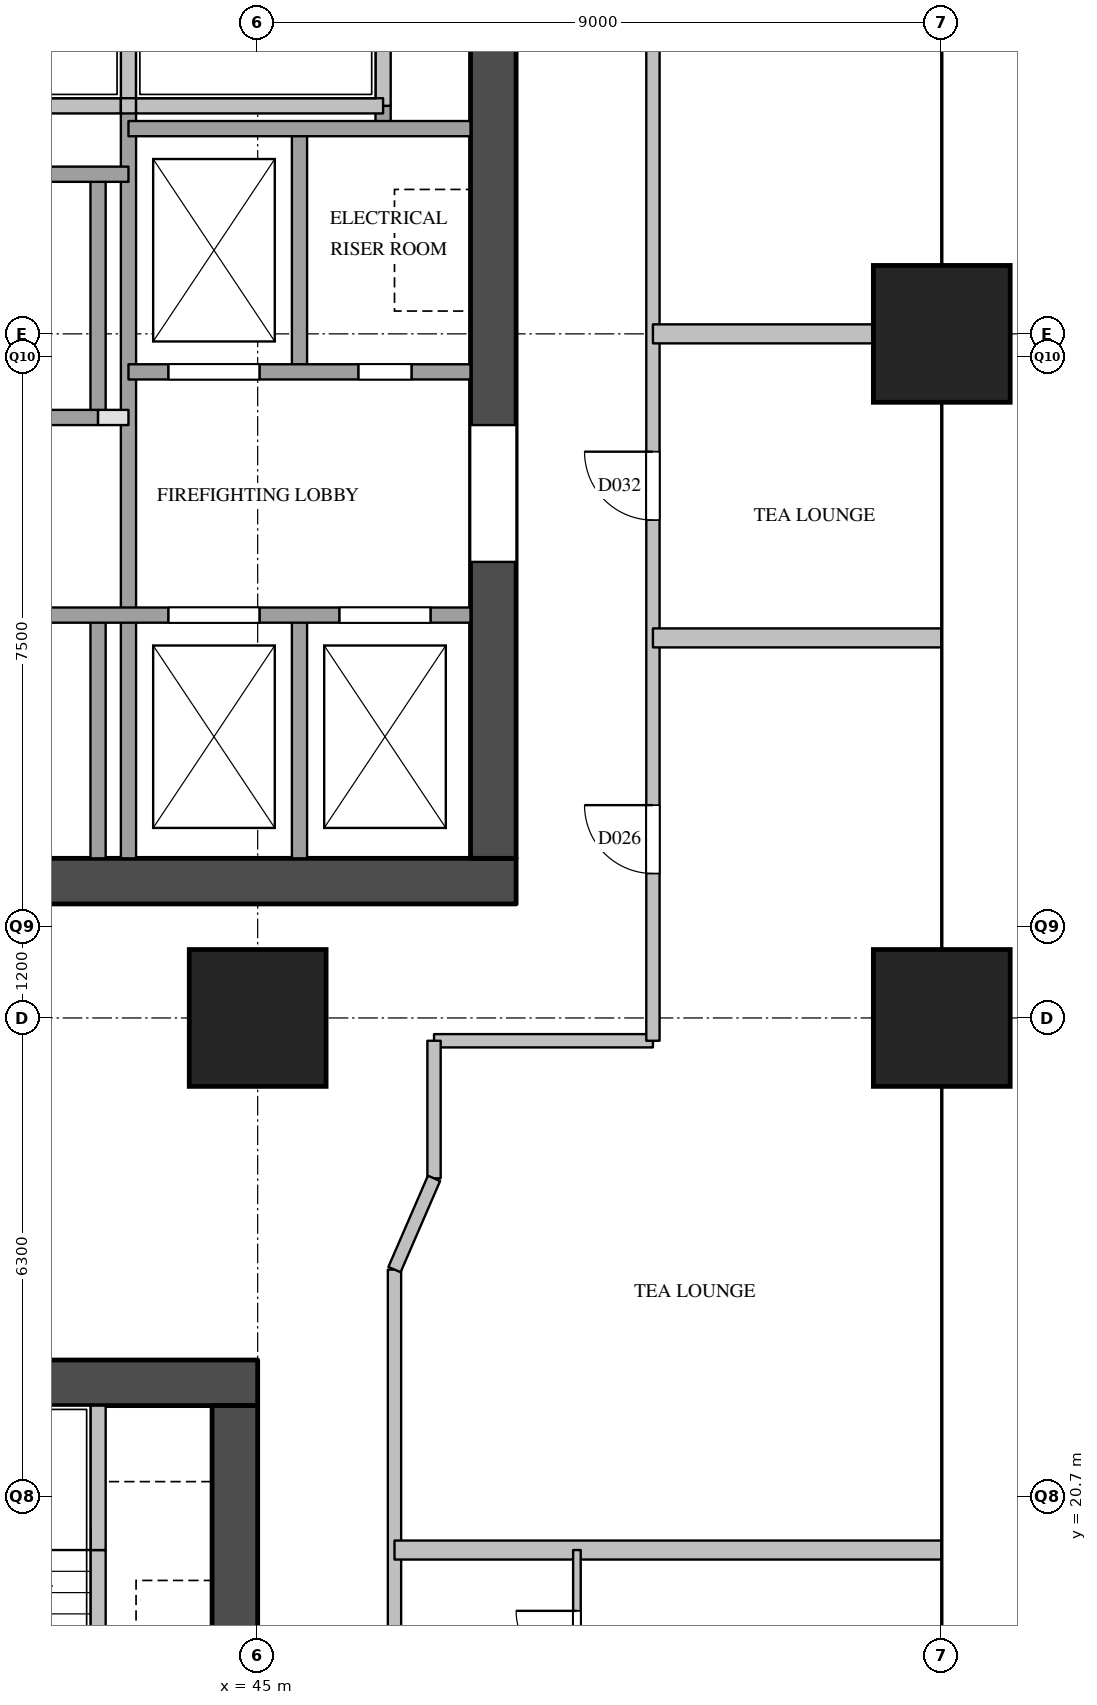
"""IFC4 building model, lengths in metres.
Left out: names, types, materials, properties, quantities, classifications, styles, units other than length and angle.
Written with IfcOpenShell. Run it as: python <this file> out.ifc"""

import sys

from ifc_helpers import new_model, si_unit, direction, frame, frame_2d, origin, origin_2d, place, context, subcontext, project, spatial, rectangle, extrude, element, fill, save


model = new_model("IFC4")
c1 = context("Model", 3, precision=1e-05, world=origin(), true_north=direction((0.0, 1.0)))
c2 = subcontext(c1, "Body", "Model", "MODEL_VIEW")
j1 = project(units=[si_unit("LENGTHUNIT", "METRE"), si_unit("PLANEANGLEUNIT", "RADIAN")], contexts=[c1])
p1 = place(None, origin())
s1 = spatial("IfcSite", under=j1, at=p1, CompositionType="ELEMENT")
p2 = place(p1, origin())
s2 = spatial("IfcBuilding", under=s1, at=p2, CompositionType="ELEMENT")
p3 = place(p2, frame((0.0, 0.0, 34.8)))
s3 = spatial("IfcBuildingStorey", under=s2, at=p3, CompositionType="ELEMENT", Elevation=34.8)
for number, where, z_axis, x_axis in (
    (1, (45.0, 27.0, 0.0), (0.0, 0.0, 1.0), (1.0, 0.0, 0.0)),
    (2, (54.0, 27.0, 0.0), (0.0, 0.0, 1.0), (1.0, 0.0, 0.0)),
    (3, (54.0, 36.0, 0.0), (0.0, 0.0, 1.0), (1.0, 0.0, 0.0)),
):
    element("IfcColumn", number, at=place(p3, frame(where, z_axis=z_axis, x_axis=x_axis)), inside=s3, PredefinedType="COLUMN", context=c2, shape_type="SweptSolid", body=[
        extrude(rectangle(XDim=1.8, YDim=1.8, at=origin_2d()), origin(), (0.0, 0.0, 1.0), 3.8),
    ])
p4 = place(p3, frame((36.0, 28.8, 0.0), z_axis=(0.0, 0.0, 1.0), x_axis=(1.0, 0.0, 0.0)))
e4 = element("IfcWall", 4, at=p4, inside=s3, PredefinedType="SHEAR", context=c2, shape_type="SweptSolid", body=[
    extrude(rectangle(XDim=12.4, YDim=0.6, at=frame_2d((6.2, 0.0))), origin(), (0.0, 0.0, 1.0), 3.5),
])
p5 = place(p3, frame((48.1, 29.1, 0.0), z_axis=(0.0, 0.0, 1.0), x_axis=(0.0, 1.0, 0.0)))
e5 = element("IfcWall", 5, at=p5, inside=s3, PredefinedType="SHEAR", context=c2, shape_type="SweptSolid", body=[
    extrude(rectangle(XDim=20.3, YDim=0.6, at=frame_2d((10.15, 0.0))), origin(), (0.0, 0.0, 1.0), 3.5),
])
p6 = place(p5, frame((12.5, 0.0, 0.0)))
e6 = element("IfcOpeningElement", 6, at=p6, cuts=e5, PredefinedType="OPENING", context=c2, shape_type="SweptSolid", body=[
    extrude(rectangle(XDim=0.7, YDim=2.1, at=frame_2d((0.35, 1.05))), frame((0.0, 0.31, 0.0), z_axis=(0.0, -1.0, 0.0), x_axis=(1.0, 0.0, 0.0)), (0.0, 0.0, 1.0), 0.62),
])
p7 = place(p5, frame((3.9, 0.0, 0.0)))
e7 = element("IfcOpeningElement", 7, at=p7, cuts=e5, PredefinedType="OPENING", context=c2, shape_type="SweptSolid", body=[
    extrude(rectangle(XDim=1.8, YDim=2.1, at=frame_2d((0.9, 1.05))), frame((0.0, 0.31, 0.0), z_axis=(0.0, -1.0, 0.0), x_axis=(1.0, 0.0, 0.0)), (0.0, 0.0, 1.0), 0.62),
])
p8 = place(p3, frame((42.9, 29.1, 0.0), z_axis=(0.0, 0.0, 1.0), x_axis=(0.0, 1.0, 0.0)))
e8 = element("IfcWall", 8, at=p8, inside=s3, PredefinedType="SOLIDWALL", context=c2, shape_type="SweptSolid", body=[
    extrude(rectangle(XDim=3.2, YDim=0.2, at=frame_2d((1.6, 0.0))), origin(), (0.0, 0.0, 1.0), 3.5),
])
p9 = place(p3, frame((42.9, 34.9, 0.0), z_axis=(0.0, 0.0, 1.0), x_axis=(0.0, 1.0, 0.0)))
e9 = element("IfcWall", 9, at=p9, inside=s3, PredefinedType="SOLIDWALL", context=c2, shape_type="SweptSolid", body=[
    extrude(rectangle(XDim=3.2, YDim=0.2, at=frame_2d((1.6, 0.0))), origin(), (0.0, 0.0, 1.0), 3.5),
])
p10 = place(p3, frame((43.3, 29.1, 0.0), z_axis=(0.0, 0.0, 1.0), x_axis=(0.0, 1.0, 0.0)))
e10 = element("IfcWall", 10, at=p10, inside=s3, PredefinedType="SOLIDWALL", context=c2, shape_type="SweptSolid", body=[
    extrude(rectangle(XDim=9.9, YDim=0.2, at=frame_2d((4.95, 0.0))), origin(), (0.0, 0.0, 1.0), 3.5),
])
p11 = place(p3, frame((43.3, 39.0, 0.0), z_axis=(0.0, 0.0, 1.0), x_axis=(0.0, 1.0, 0.0)))
e11 = element("IfcWall", 11, at=p11, inside=s3, PredefinedType="SOLIDWALL", context=c2, shape_type="SweptSolid", body=[
    extrude(rectangle(XDim=1.78, YDim=0.2, at=frame_2d((0.89, 0.0))), origin(), (0.0, 0.0, 1.0), 3.5),
])
for number, where, z_axis, x_axis in (
    (12, (45.55, 29.1, 0.0), (0.0, 0.0, 1.0), (0.0, 1.0, 0.0)),
    (13, (45.55, 35.5, 0.0), (0.0, 0.0, 1.0), (0.0, 1.0, 0.0)),
):
    element("IfcWall", number, at=place(p3, frame(where, z_axis=z_axis, x_axis=x_axis)), inside=s3, PredefinedType="SOLIDWALL", context=c2, shape_type="SweptSolid", body=[
        extrude(rectangle(XDim=3.2, YDim=0.2, at=frame_2d((1.6, 0.0))), origin(), (0.0, 0.0, 1.0), 3.5),
    ])
p12 = place(p3, frame((46.65, 38.7, 0.0), z_axis=(0.0, 0.0, 1.0), x_axis=(0.0, 1.0, 0.0)))
e14 = element("IfcWall", 14, at=p12, inside=s3, PredefinedType="SOLIDWALL", context=c2, shape_type="SweptSolid", body=[
    extrude(rectangle(XDim=0.3, YDim=0.2, at=frame_2d((0.15, 0.0))), origin(), (0.0, 0.0, 1.0), 3.5),
])
p13 = place(p3, frame((46.65, 39.0, 0.0), z_axis=(0.0, 0.0, 1.0), x_axis=(0.0, 1.0, 0.0)))
e15 = element("IfcWall", 15, at=p13, inside=s3, PredefinedType="SOLIDWALL", context=c2, shape_type="SweptSolid", body=[
    extrude(rectangle(XDim=1.78, YDim=0.2, at=frame_2d((0.89, 0.0))), origin(), (0.0, 0.0, 1.0), 3.5),
])
p14 = place(p3, frame((36.6, 32.3, 0.0), z_axis=(0.0, 0.0, 1.0), x_axis=(1.0, 0.0, 0.0)))
e16 = element("IfcWall", 16, at=p14, inside=s3, PredefinedType="SOLIDWALL", context=c2, shape_type="SweptSolid", body=[
    extrude(rectangle(XDim=11.2, YDim=0.2, at=frame_2d((5.6, 0.0))), origin(), (0.0, 0.0, 1.0), 3.5),
])
p15 = place(p14, frame((7.225, 0.0, 0.0)))
e17 = element("IfcOpeningElement", 17, at=p15, cuts=e16, PredefinedType="OPENING", context=c2, shape_type="SweptSolid", body=[
    extrude(rectangle(XDim=1.2, YDim=2.1, at=frame_2d((0.6, 1.05))), frame((0.0, 0.11, 0.0), z_axis=(0.0, -1.0, 0.0), x_axis=(1.0, 0.0, 0.0)), (0.0, 0.0, 1.0), 0.22),
])
p16 = place(p14, frame((9.475, 0.0, 0.0)))
e18 = element("IfcOpeningElement", 18, at=p16, cuts=e16, PredefinedType="OPENING", context=c2, shape_type="SweptSolid", body=[
    extrude(rectangle(XDim=1.2, YDim=2.1, at=frame_2d((0.6, 1.05))), frame((0.0, 0.11, 0.0), z_axis=(0.0, -1.0, 0.0), x_axis=(1.0, 0.0, 0.0)), (0.0, 0.0, 1.0), 0.22),
])
p17 = place(p3, frame((42.9, 34.9, 0.0), z_axis=(0.0, 0.0, 1.0), x_axis=(1.0, 0.0, 0.0)))
e19 = element("IfcWall", 19, at=p17, inside=s3, PredefinedType="PARTITIONING", context=c2, shape_type="SweptSolid", body=[
    extrude(rectangle(XDim=0.4, YDim=0.2, at=frame_2d((0.2, 0.0))), origin(), (0.0, 0.0, 1.0), 3.5),
])
p18 = place(p3, frame((36.6, 34.9, 0.0), z_axis=(0.0, 0.0, 1.0), x_axis=(1.0, 0.0, 0.0)))
e20 = element("IfcWall", 20, at=p18, inside=s3, PredefinedType="SOLIDWALL", context=c2, shape_type="SweptSolid", body=[
    extrude(rectangle(XDim=6.3, YDim=0.2, at=frame_2d((3.15, 0.0))), origin(), (0.0, 0.0, 1.0), 3.5),
])
p19 = place(p3, frame((43.3, 35.5, 0.0), z_axis=(0.0, 0.0, 1.0), x_axis=(1.0, 0.0, 0.0)))
e21 = element("IfcWall", 21, at=p19, inside=s3, PredefinedType="SOLIDWALL", context=c2, shape_type="SweptSolid", body=[
    extrude(rectangle(XDim=4.5, YDim=0.2, at=frame_2d((2.25, 0.0))), origin(), (0.0, 0.0, 1.0), 3.5),
])
p20 = place(p19, frame((0.525, 0.0, 0.0)))
e22 = element("IfcOpeningElement", 22, at=p20, cuts=e21, PredefinedType="OPENING", context=c2, shape_type="SweptSolid", body=[
    extrude(rectangle(XDim=1.2, YDim=2.1, at=frame_2d((0.6, 1.05))), frame((0.0, 0.11, 0.0), z_axis=(0.0, -1.0, 0.0), x_axis=(1.0, 0.0, 0.0)), (0.0, 0.0, 1.0), 0.22),
])
p21 = place(p19, frame((3.025, 0.0, 0.0)))
e23 = element("IfcOpeningElement", 23, at=p21, cuts=e21, PredefinedType="OPENING", context=c2, shape_type="SweptSolid", body=[
    extrude(rectangle(XDim=0.7, YDim=2.1, at=frame_2d((0.35, 1.05))), frame((0.0, 0.11, 0.0), z_axis=(0.0, -1.0, 0.0), x_axis=(1.0, 0.0, 0.0)), (0.0, 0.0, 1.0), 0.22),
])
p22 = place(p3, frame((36.6, 38.1, 0.0), z_axis=(0.0, 0.0, 1.0), x_axis=(1.0, 0.0, 0.0)))
e24 = element("IfcWall", 24, at=p22, inside=s3, PredefinedType="SOLIDWALL", context=c2, shape_type="SweptSolid", body=[
    extrude(rectangle(XDim=6.7, YDim=0.2, at=frame_2d((3.35, 0.0))), origin(), (0.0, 0.0, 1.0), 3.5),
])
p23 = place(p3, frame((43.3, 38.7, 0.0), z_axis=(0.0, 0.0, 1.0), x_axis=(1.0, 0.0, 0.0)))
e25 = element("IfcWall", 25, at=p23, inside=s3, PredefinedType="SOLIDWALL", context=c2, shape_type="SweptSolid", body=[
    extrude(rectangle(XDim=4.5, YDim=0.2, at=frame_2d((2.25, 0.0))), origin(), (0.0, 0.0, 1.0), 3.5),
])
p24 = place(p3, frame((40.05, 39.0, 0.0), z_axis=(0.0, 0.0, 1.0), x_axis=(1.0, 0.0, 0.0)))
e26 = element("IfcWall", 26, at=p24, inside=s3, PredefinedType="SOLIDWALL", context=c2, shape_type="SweptSolid", body=[
    extrude(rectangle(XDim=3.15, YDim=0.2, at=frame_2d((1.575, 0.0))), origin(), (0.0, 0.0, 1.0), 3.5),
])
p25 = place(p3, frame((43.2, 39.0, 0.0), z_axis=(0.0, 0.0, 1.0), x_axis=(1.0, 0.0, 0.0)))
e27 = element("IfcWall", 27, at=p25, inside=s3, PredefinedType="SOLIDWALL", context=c2, shape_type="SweptSolid", body=[
    extrude(rectangle(XDim=0.2, YDim=0.2, at=frame_2d((0.1, 0.0))), origin(), (0.0, 0.0, 1.0), 3.5),
])
p26 = place(p3, frame((43.4, 39.0, 0.0), z_axis=(0.0, 0.0, 1.0), x_axis=(1.0, 0.0, 0.0)))
e28 = element("IfcWall", 28, at=p26, inside=s3, PredefinedType="SOLIDWALL", context=c2, shape_type="SweptSolid", body=[
    extrude(rectangle(XDim=3.25, YDim=0.2, at=frame_2d((1.625, 0.0))), origin(), (0.0, 0.0, 1.0), 3.5),
])
p27 = place(p3, frame((36.0, 22.2, 0.0), z_axis=(0.0, 0.0, 1.0), x_axis=(1.0, 0.0, 0.0)))
e29 = element("IfcWall", 29, at=p27, inside=s3, PredefinedType="SHEAR", context=c2, shape_type="SweptSolid", body=[
    extrude(rectangle(XDim=9.0, YDim=0.6, at=frame_2d((4.5, 0.0))), origin(), (0.0, 0.0, 1.0), 3.5),
])
p28 = place(p3, frame((44.7, 9.6, 0.0), z_axis=(0.0, 0.0, 1.0), x_axis=(0.0, 1.0, 0.0)))
e30 = element("IfcWall", 30, at=p28, inside=s3, PredefinedType="SHEAR", context=c2, shape_type="SweptSolid", body=[
    extrude(rectangle(XDim=12.3, YDim=0.6, at=frame_2d((6.15, 0.0))), origin(), (0.0, 0.0, 1.0), 3.5),
])
p29 = place(p28, frame((0.8, 0.0, 0.0)))
e31 = element("IfcOpeningElement", 31, at=p29, cuts=e30, PredefinedType="OPENING", context=c2, shape_type="SweptSolid", body=[
    extrude(rectangle(XDim=0.7, YDim=2.1, at=frame_2d((0.35, 1.05))), frame((0.0, 0.31, 0.0), z_axis=(0.0, -1.0, 0.0), x_axis=(1.0, 0.0, 0.0)), (0.0, 0.0, 1.0), 0.62),
])
p30 = place(p3, frame((42.9, 15.7, 0.0), z_axis=(0.0, 0.0, 1.0), x_axis=(0.0, 1.0, 0.0)))
e32 = element("IfcWall", 32, at=p30, inside=s3, PredefinedType="SOLIDWALL", context=c2, shape_type="SweptSolid", body=[
    extrude(rectangle(XDim=4.3, YDim=0.2, at=frame_2d((2.15, 0.0))), origin(), (0.0, 0.0, 1.0), 3.5),
])
p31 = place(p3, frame((42.9, 20.0, 0.0), z_axis=(0.0, 0.0, 1.0), x_axis=(0.0, 1.0, 0.0)))
e33 = element("IfcWall", 33, at=p31, inside=s3, PredefinedType="SOLIDWALL", context=c2, shape_type="SweptSolid", body=[
    extrude(rectangle(XDim=1.9, YDim=0.2, at=frame_2d((0.95, 0.0))), origin(), (0.0, 0.0, 1.0), 3.5),
])
p32 = place(p3, frame((47.32, 26.7, 0.0), z_axis=(0.0, 0.0, 1.0), x_axis=(1.0, 0.0, 0.0)))
e34 = element("IfcWall", 34, at=p32, inside=s3, PredefinedType="PARTITIONING", context=c2, shape_type="SweptSolid", body=[
    extrude(rectangle(XDim=2.88, YDim=0.175, at=frame_2d((1.44, 0.0))), origin(), (0.0, 0.0, 1.0), 2.5),
])
p33 = place(p3, frame((46.8, 7.2, 0.0), z_axis=(0.0, 0.0, 1.0), x_axis=(0.0, 1.0, 0.0)))
e35 = element("IfcWall", 35, at=p33, inside=s3, PredefinedType="PARTITIONING", context=c2, shape_type="SweptSolid", body=[
    extrude(rectangle(XDim=16.49, YDim=0.175, at=frame_2d((8.245, 0.0))), origin(), (0.0, 0.0, 1.0), 3.5),
])
p34 = place(p33, frame((3.1, 0.0, 0.0)))
e36 = element("IfcOpeningElement", 36, at=p34, cuts=e35, PredefinedType="OPENING", context=c2, shape_type="SweptSolid", body=[
    extrude(rectangle(XDim=1.0, YDim=2.1, at=frame_2d((0.5, 1.05))), frame((0.0, 0.097, 0.0), z_axis=(0.0, -1.0, 0.0), x_axis=(1.0, 0.0, 0.0)), (0.0, 0.0, 1.0), 0.195),
])
p35 = place(p33, frame((9.1, 0.0, 0.0)))
e37 = element("IfcOpeningElement", 37, at=p35, cuts=e35, PredefinedType="OPENING", context=c2, shape_type="SweptSolid", body=[
    extrude(rectangle(XDim=1.0, YDim=2.1, at=frame_2d((0.5, 1.05))), frame((0.0, 0.097, 0.0), z_axis=(0.0, -1.0, 0.0), x_axis=(1.0, 0.0, 0.0)), (0.0, 0.0, 1.0), 0.195),
])
p36 = place(p3, frame((47.32, 24.89, 0.0), z_axis=(0.0, 0.0, 1.0), x_axis=(0.0, 1.0, 0.0)))
e38 = element("IfcWall", 38, at=p36, inside=s3, PredefinedType="PARTITIONING", context=c2, shape_type="SweptSolid", body=[
    extrude(rectangle(XDim=1.81, YDim=0.175, at=frame_2d((0.905, 0.0))), origin(), (0.0, 0.0, 1.0), 2.5),
])
p37 = place(p3, frame((50.2, 26.7, 0.0), z_axis=(0.0, 0.0, 1.0), x_axis=(0.0, 1.0, 0.0)))
e39 = element("IfcWall", 39, at=p37, inside=s3, PredefinedType="PARTITIONING", context=c2, shape_type="SweptSolid", body=[
    extrude(rectangle(XDim=25.1, YDim=0.175, at=frame_2d((12.55, 0.0))), origin(), (0.0, 0.0, 1.0), 2.5),
])
p38 = place(p37, frame((2.2, 0.0, 0.0)))
e40 = element("IfcOpeningElement", 40, at=p38, cuts=e39, PredefinedType="OPENING", context=c2, shape_type="SweptSolid", body=[
    extrude(rectangle(XDim=0.9, YDim=2.1, at=frame_2d((0.45, 1.05))), frame((0.0, 0.097, 0.0), z_axis=(0.0, -1.0, 0.0), x_axis=(1.0, 0.0, 0.0)), (0.0, 0.0, 1.0), 0.195),
])
p39 = place(p37, frame((6.85, 0.0, 0.0)))
e41 = element("IfcOpeningElement", 41, at=p39, cuts=e39, PredefinedType="OPENING", context=c2, shape_type="SweptSolid", body=[
    extrude(rectangle(XDim=0.9, YDim=2.1, at=frame_2d((0.45, 1.05))), frame((0.0, 0.097, 0.0), z_axis=(0.0, -1.0, 0.0), x_axis=(1.0, 0.0, 0.0)), (0.0, 0.0, 1.0), 0.195),
])
p40 = place(p37, frame((16.75, 0.0, 0.0)))
e42 = element("IfcOpeningElement", 42, at=p40, cuts=e39, PredefinedType="OPENING", context=c2, shape_type="SweptSolid", body=[
    extrude(rectangle(XDim=0.9, YDim=2.1, at=frame_2d((0.45, 1.05))), frame((0.0, 0.097, 0.0), z_axis=(0.0, -1.0, 0.0), x_axis=(1.0, 0.0, 0.0)), (0.0, 0.0, 1.0), 0.195),
])
p41 = place(p3, frame((46.8, 20.0, 0.0), z_axis=(0.0, 0.0, 1.0), x_axis=(1.0, 0.0, 0.0)))
e43 = element("IfcWall", 43, at=p41, inside=s3, PredefinedType="PARTITIONING", context=c2, shape_type="SweptSolid", body=[
    extrude(rectangle(XDim=7.2, YDim=0.25, at=frame_2d((3.6, 0.0))), origin(), (0.0, 0.0, 1.0), 2.5),
])
p42 = place(p3, frame((50.2, 32.0, 0.0), z_axis=(0.0, 0.0, 1.0), x_axis=(1.0, 0.0, 0.0)))
e44 = element("IfcWall", 44, at=p42, inside=s3, PredefinedType="PARTITIONING", context=c2, shape_type="SweptSolid", body=[
    extrude(rectangle(XDim=3.8, YDim=0.25, at=frame_2d((1.9, 0.0))), origin(), (0.0, 0.0, 1.0), 2.5),
])
p43 = place(p3, frame((50.2, 36.0, 0.0), z_axis=(0.0, 0.0, 1.0), x_axis=(1.0, 0.0, 0.0)))
e45 = element("IfcWall", 45, at=p43, inside=s3, PredefinedType="PARTITIONING", context=c2, shape_type="SweptSolid", body=[
    extrude(rectangle(XDim=3.8, YDim=0.25, at=frame_2d((1.9, 0.0))), origin(), (0.0, 0.0, 1.0), 3.5),
])
p44 = place(p3, frame((49.2, 17.6, 0.0), z_axis=(0.0, 0.0, 1.0), x_axis=(0.0, 1.0, 0.0)))
e46 = element("IfcWall", 46, at=p44, inside=s3, PredefinedType="PARTITIONING", context=c2, shape_type="SweptSolid", body=[
    extrude(rectangle(XDim=2.4, YDim=0.1, at=frame_2d((1.2, 0.0))), origin(), (0.0, 0.0, 1.0), 3.5),
])
p45 = place(p44, frame((0.8, 0.0, 0.0)))
e47 = element("IfcOpeningElement", 47, at=p45, cuts=e46, PredefinedType="OPENING", context=c2, shape_type="SweptSolid", body=[
    extrude(rectangle(XDim=0.8, YDim=2.1, at=frame_2d((0.4, 1.05))), frame((0.0, 0.06, 0.0), z_axis=(0.0, -1.0, 0.0), x_axis=(1.0, 0.0, 0.0)), (0.0, 0.0, 1.0), 0.12),
])
p46 = place(p3, frame((47.32, 24.89, 0.0), z_axis=(0.0, 0.0, 1.0), x_axis=(-0.397633632391, -0.917544273804, 0.0)))
e48 = element("IfcWall", 48, at=p46, inside=s3, PredefinedType="PARTITIONING", context=c2, shape_type="SweptSolid", body=[
    extrude(rectangle(XDim=1.308, YDim=0.175, at=frame_2d((0.654, 0.0))), origin(), (0.0, 0.0, 1.0), 3.5),
])
p47 = place(p15, origin())
e49 = element("IfcDoor", 49, at=p47, inside=s3, OperationType="SLIDING_TO_LEFT", PredefinedType="DOOR", context=c2, shape_type="SweptSolid", body=[
    extrude(rectangle(XDim=1.2, YDim=2.1, at=frame_2d((0.6, 1.05))), frame((0.0, 0.025, 0.0), z_axis=(0.0, -1.0, 0.0), x_axis=(1.0, 0.0, 0.0)), (0.0, 0.0, 1.0), 0.05),
])
fill(e17, e49)
p48 = place(p16, origin())
e50 = element("IfcDoor", 50, at=p48, inside=s3, OperationType="SLIDING_TO_LEFT", PredefinedType="DOOR", context=c2, shape_type="SweptSolid", body=[
    extrude(rectangle(XDim=1.2, YDim=2.1, at=frame_2d((0.6, 1.05))), frame((0.0, 0.025, 0.0), z_axis=(0.0, -1.0, 0.0), x_axis=(1.0, 0.0, 0.0)), (0.0, 0.0, 1.0), 0.05),
])
fill(e18, e50)
p49 = place(p20, origin())
e51 = element("IfcDoor", 51, at=p49, inside=s3, OperationType="SLIDING_TO_LEFT", PredefinedType="DOOR", context=c2, shape_type="SweptSolid", body=[
    extrude(rectangle(XDim=1.2, YDim=2.1, at=frame_2d((0.6, 1.05))), frame((0.0, 0.025, 0.0), z_axis=(0.0, -1.0, 0.0), x_axis=(1.0, 0.0, 0.0)), (0.0, 0.0, 1.0), 0.05),
])
fill(e22, e51)
p50 = place(p7, origin())
e52 = element("IfcDoor", 52, at=p50, inside=s3, OperationType="DOUBLE_DOOR_SINGLE_SWING", PredefinedType="DOOR", context=c2, shape_type="SweptSolid", body=[
    extrude(rectangle(XDim=1.8, YDim=2.1, at=frame_2d((0.9, 1.05))), frame((0.0, 0.025, 0.0), z_axis=(0.0, -1.0, 0.0), x_axis=(1.0, 0.0, 0.0)), (0.0, 0.0, 1.0), 0.05),
])
fill(e7, e52)
p51 = place(p21, origin())
e53 = element("IfcDoor", 53, at=p51, inside=s3, OperationType="SINGLE_SWING_RIGHT", PredefinedType="DOOR", context=c2, shape_type="SweptSolid", body=[
    extrude(rectangle(XDim=0.7, YDim=2.1, at=frame_2d((0.35, 1.05))), frame((0.0, 0.025, 0.0), z_axis=(0.0, -1.0, 0.0), x_axis=(1.0, 0.0, 0.0)), (0.0, 0.0, 1.0), 0.05),
])
fill(e23, e53)
p52 = place(p45, origin())
e54 = element("IfcDoor", 54, at=p52, inside=s3, OperationType="SINGLE_SWING_RIGHT", PredefinedType="DOOR", context=c2, shape_type="SweptSolid", body=[
    extrude(rectangle(XDim=0.8, YDim=2.1, at=frame_2d((0.4, 1.05))), frame((0.0, 0.025, 0.0), z_axis=(0.0, -1.0, 0.0), x_axis=(1.0, 0.0, 0.0)), (0.0, 0.0, 1.0), 0.05),
])
fill(e47, e54)
p53 = place(p38, origin())
e55 = element("IfcDoor", 55, at=p53, inside=s3, OperationType="SINGLE_SWING_RIGHT", PredefinedType="DOOR", context=c2, shape_type="SweptSolid", body=[
    extrude(rectangle(XDim=0.9, YDim=2.1, at=frame_2d((0.45, 1.05))), frame((0.0, 0.025, 0.0), z_axis=(0.0, -1.0, 0.0), x_axis=(1.0, 0.0, 0.0)), (0.0, 0.0, 1.0), 0.05),
])
fill(e40, e55)
p54 = place(p39, origin())
e56 = element("IfcDoor", 56, at=p54, inside=s3, OperationType="SINGLE_SWING_RIGHT", PredefinedType="DOOR", context=c2, shape_type="SweptSolid", body=[
    extrude(rectangle(XDim=0.9, YDim=2.1, at=frame_2d((0.45, 1.05))), frame((0.0, 0.025, 0.0), z_axis=(0.0, -1.0, 0.0), x_axis=(1.0, 0.0, 0.0)), (0.0, 0.0, 1.0), 0.05),
])
fill(e41, e56)
save(model, sys.argv[1])
